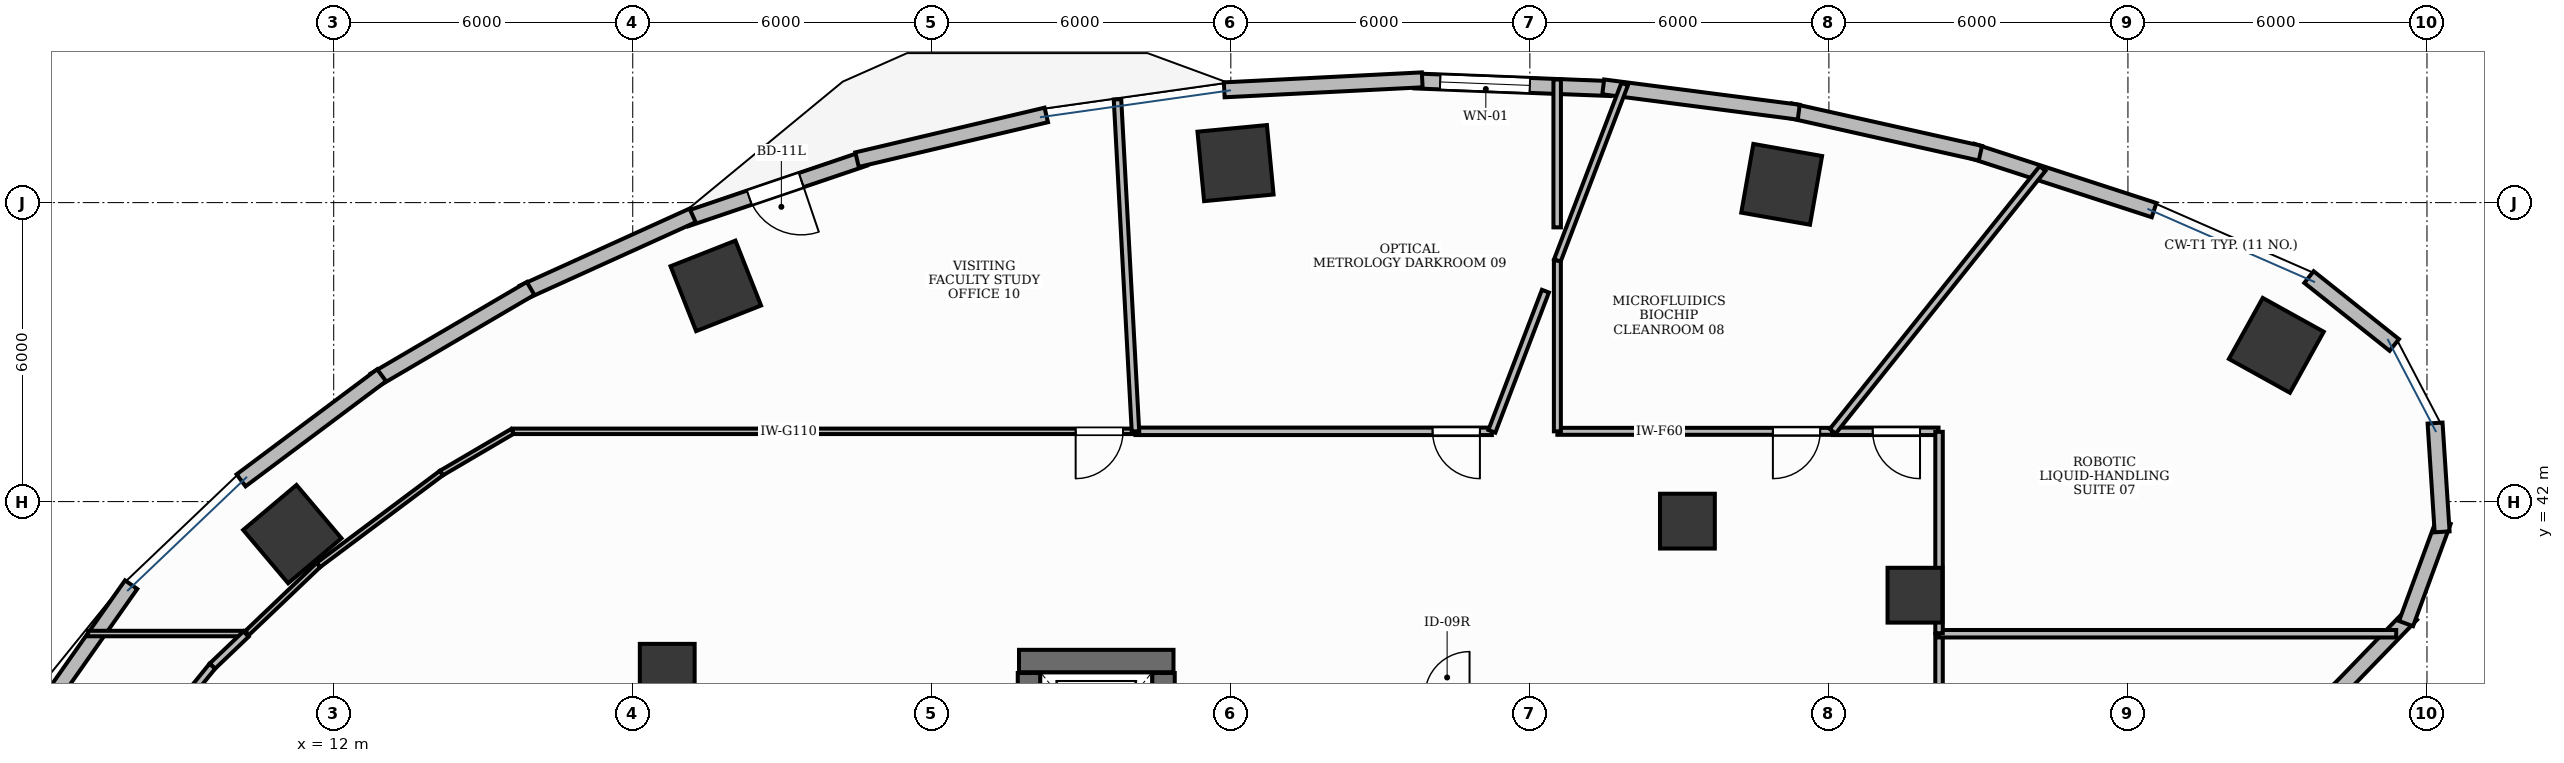
"""IFC4 building model, lengths in metres.
Left out: names, types, materials, properties, quantities, classifications, styles, units other than length and angle.
Written with IfcOpenShell. Run it as: python <this file> out.ifc"""

import sys

from ifc_helpers import new_model, si_unit, direction, frame, frame_2d, origin, origin_2d, place, context, subcontext, project, spatial, rectangle, extrude, element, fill, save


model = new_model("IFC4")
c1 = context("Model", 3, precision=1e-05, world=origin(), true_north=direction((0.0, 1.0)))
c2 = subcontext(c1, "Body", "Model", "MODEL_VIEW")
j1 = project(units=[si_unit("LENGTHUNIT", "METRE"), si_unit("PLANEANGLEUNIT", "RADIAN")], contexts=[c1])
p1 = place(None, origin())
s1 = spatial("IfcSite", under=j1, at=p1, CompositionType="ELEMENT")
p2 = place(p1, origin())
s2 = spatial("IfcBuilding", under=s1, at=p2, CompositionType="ELEMENT")
p3 = place(p2, frame((0.0, 0.0, 51.0)))
s3 = spatial("IfcBuildingStorey", under=s2, at=p3, CompositionType="ELEMENT", Elevation=51.0)
p4 = place(p3, frame((25.75, 38.8, 0.0), z_axis=(0.0, 0.0, 1.0), x_axis=(1.0, 0.0, 0.0)))
e1 = element("IfcWall", 1, at=p4, inside=s3, PredefinedType="SHEAR", context=c2, shape_type="SweptSolid", body=[
    extrude(rectangle(XDim=3.1, YDim=0.45, at=frame_2d((1.55, 0.0))), origin(), (0.0, 0.0, 1.0), 3.9),
])
for number, where, z_axis, x_axis in (
    (2, (25.95, 35.86, 0.0), (0.0, 0.0, 1.0), (0.0, 1.0, 0.0)),
    (3, (28.65, 35.86, 0.0), (0.0, 0.0, 1.0), (0.0, 1.0, 0.0)),
):
    element("IfcWall", number, at=place(p3, frame(where, z_axis=z_axis, x_axis=x_axis)), inside=s3, PredefinedType="SHEAR", context=c2, shape_type="SweptSolid", body=[
        extrude(rectangle(XDim=2.7, YDim=0.45, at=frame_2d((1.35, 0.0))), origin(), (0.0, 0.0, 1.0), 3.9),
    ])
p5 = place(p3, frame((50.977, 45.135, -0.0), z_axis=(0.0, 0.0, 1.0), x_axis=(-0.874535078577, 0.484962262797, 0.0)))
e4 = element("IfcColumn", 4, at=p5, inside=s3, PredefinedType="COLUMN", context=c2, shape_type="SweptSolid", body=[
    extrude(rectangle(XDim=1.4, YDim=1.4, at=origin_2d()), origin(), (0.0, 0.0, 1.0), 3.901),
])
p6 = place(p3, frame((43.727, 40.121, -0.0), z_axis=(0.0, 0.0, 1.0), x_axis=(1.0, 0.0, 0.0)))
e5 = element("IfcColumn", 5, at=p6, inside=s3, PredefinedType="COLUMN", context=c2, shape_type="SweptSolid", body=[
    extrude(rectangle(XDim=1.1, YDim=1.1, at=origin_2d()), origin(), (0.0, 0.0, 1.0), 3.901),
])
p7 = place(p3, frame((41.052, 48.367, -0.0), z_axis=(0.0, 0.0, 1.0), x_axis=(-0.984868307662, 0.173304404339, 0.0)))
e6 = element("IfcColumn", 6, at=p7, inside=s3, PredefinedType="COLUMN", context=c2, shape_type="SweptSolid", body=[
    extrude(rectangle(XDim=1.4, YDim=1.4, at=origin_2d()), origin(), (0.0, 0.0, 1.0), 3.901),
])
p8 = place(p3, frame((39.161, 41.608, -0.0), z_axis=(0.0, 0.0, 1.0), x_axis=(1.0, 0.0, 0.0)))
e7 = element("IfcColumn", 7, at=p8, inside=s3, PredefinedType="COLUMN", context=c2, shape_type="SweptSolid", body=[
    extrude(rectangle(XDim=1.1, YDim=1.1, at=origin_2d()), origin(), (0.0, 0.0, 1.0), 3.901),
])
for number, where, z_axis, x_axis in (
    (8, (30.094, 48.792, -0.0), (0.0, 0.0, 1.0), (0.995, 0.095, 0.0)),
    (9, (19.667, 46.329, -0.0), (0.0, 0.0, 1.0), (0.93, 0.367, 0.0)),
    (10, (11.17, 41.347, -0.0), (0.0, 0.0, 1.0), (0.764, 0.645, 0.0)),
):
    element("IfcColumn", number, at=place(p3, frame(where, z_axis=z_axis, x_axis=x_axis)), inside=s3, PredefinedType="COLUMN", context=c2, shape_type="SweptSolid", body=[
        extrude(rectangle(XDim=1.4, YDim=1.4, at=origin_2d()), origin(), (0.0, 0.0, 1.0), 3.901),
    ])
p9 = place(p3, frame((18.692, 38.595, -0.0), z_axis=(0.0, 0.0, 1.0), x_axis=(1.0, 0.0, 0.0)))
e11 = element("IfcColumn", 11, at=p9, inside=s3, PredefinedType="COLUMN", context=c2, shape_type="SweptSolid", body=[
    extrude(rectangle(XDim=1.1, YDim=1.1, at=origin_2d()), origin(), (0.0, 0.0, 1.0), 3.901),
])
p10 = place(p3, frame((37.623, 50.289, 0.0), z_axis=(0.0, 0.0, 1.0), x_axis=(-0.999247008469, 0.038799691558, 0.0)))
e12 = element("IfcWall", 12, at=p10, inside=s3, PredefinedType="STANDARD", context=c2, shape_type="SweptSolid", body=[
    extrude(rectangle(XDim=3.939, YDim=0.3, at=frame_2d((1.969, 0.0))), origin(), (0.0, 0.0, 1.0), 3.9),
])
p11 = place(p10, frame((1.625, 0.0, 0.9)))
e13 = element("IfcOpeningElement", 13, at=p11, cuts=e12, PredefinedType="OPENING", context=c2, shape_type="SweptSolid", body=[
    extrude(rectangle(XDim=1.8, YDim=2.1, at=frame_2d((0.9, 1.05))), frame((0.0, 0.165, 0.0), z_axis=(0.0, -1.0, 0.0), x_axis=(1.0, 0.0, 0.0)), (0.0, 0.0, 1.0), 0.33),
])
p12 = place(p3, frame((22.655, 48.884, 0.0), z_axis=(0.0, 0.0, 1.0), x_axis=(-0.947034337234, -0.321132315564, 0.0)))
e14 = element("IfcWall", 14, at=p12, inside=s3, PredefinedType="STANDARD", context=c2, shape_type="SweptSolid", body=[
    extrude(rectangle(XDim=3.79, YDim=0.3, at=frame_2d((1.895, 0.0))), origin(), (0.0, 0.0, 1.0), 3.9),
])
p13 = place(p12, frame((1.345, 0.0, 0.0)))
e15 = element("IfcOpeningElement", 15, at=p13, cuts=e14, PredefinedType="OPENING", context=c2, shape_type="SweptSolid", body=[
    extrude(rectangle(XDim=1.1, YDim=2.15, at=frame_2d((0.55, 1.075))), frame((0.0, 0.165, 0.0), z_axis=(0.0, -1.0, 0.0), x_axis=(1.0, 0.0, 0.0)), (0.0, 0.0, 1.0), 0.33),
])
p14 = place(p3, frame((48.525, 47.849, 0.0), z_axis=(0.0, 0.0, 1.0), x_axis=(-0.950965833732, 0.309295947393, 0.0)))
e16 = element("IfcWall", 16, at=p14, inside=s3, PredefinedType="STANDARD", context=c2, shape_type="SweptSolid", body=[
    extrude(rectangle(XDim=3.84, YDim=0.3, at=frame_2d((1.92, 0.0))), origin(), (0.0, 0.0, 1.0), 3.9),
])
p15 = place(p3, frame((45.04, 48.991, 0.0), z_axis=(0.0, 0.0, 1.0), x_axis=(-0.975868573345, 0.218358713032, 0.0)))
e17 = element("IfcWall", 17, at=p15, inside=s3, PredefinedType="STANDARD", context=c2, shape_type="SweptSolid", body=[
    extrude(rectangle(XDim=3.909, YDim=0.3, at=frame_2d((1.954, 0.0))), origin(), (0.0, 0.0, 1.0), 3.9),
])
p16 = place(p3, frame((41.395, 49.815, 0.0), z_axis=(0.0, 0.0, 1.0), x_axis=(-0.991734095036, 0.128310111617, 0.0)))
e18 = element("IfcWall", 18, at=p16, inside=s3, PredefinedType="STANDARD", context=c2, shape_type="SweptSolid", body=[
    extrude(rectangle(XDim=3.956, YDim=0.3, at=frame_2d((1.978, 0.0))), origin(), (0.0, 0.0, 1.0), 3.9),
])
p17 = place(p3, frame((33.84, 50.463, 0.0), z_axis=(0.0, 0.0, 1.0), x_axis=(-0.998732359232, -0.050335619826, 0.0)))
e19 = element("IfcWall", 19, at=p17, inside=s3, PredefinedType="STANDARD", context=c2, shape_type="SweptSolid", body=[
    extrude(rectangle(XDim=3.977, YDim=0.3, at=frame_2d((1.989, 0.0))), origin(), (0.0, 0.0, 1.0), 3.9),
])
p18 = place(p3, frame((26.297, 49.759, 0.0), z_axis=(0.0, 0.0, 1.0), x_axis=(-0.973197600754, -0.229970497863, 0.0)))
e20 = element("IfcWall", 20, at=p18, inside=s3, PredefinedType="STANDARD", context=c2, shape_type="SweptSolid", body=[
    extrude(rectangle(XDim=3.901, YDim=0.3, at=frame_2d((1.951, 0.0))), origin(), (0.0, 0.0, 1.0), 3.9),
])
p19 = place(p3, frame((19.201, 47.743, 0.0), z_axis=(0.0, 0.0, 1.0), x_axis=(-0.910623406862, -0.413237233166, 0.0)))
e21 = element("IfcWall", 21, at=p19, inside=s3, PredefinedType="STANDARD", context=c2, shape_type="SweptSolid", body=[
    extrude(rectangle(XDim=3.74, YDim=0.3, at=frame_2d((1.87, 0.0))), origin(), (0.0, 0.0, 1.0), 3.47),
])
p20 = place(p3, frame((15.951, 46.278, 0.0), z_axis=(0.0, 0.0, 1.0), x_axis=(-0.8624654944, -0.506115867139, 0.0)))
e22 = element("IfcWall", 22, at=p20, inside=s3, PredefinedType="STANDARD", context=c2, shape_type="SweptSolid", body=[
    extrude(rectangle(XDim=3.635, YDim=0.3, at=frame_2d((1.818, 0.0))), origin(), (0.0, 0.0, 1.0), 3.9),
])
p21 = place(p3, frame((12.961, 44.535, 0.0), z_axis=(0.0, 0.0, 1.0), x_axis=(-0.800823020995, -0.598901067827, 0.0)))
e23 = element("IfcWall", 23, at=p21, inside=s3, PredefinedType="STANDARD", context=c2, shape_type="SweptSolid", body=[
    extrude(rectangle(XDim=3.521, YDim=0.3, at=frame_2d((1.76, 0.0))), origin(), (0.0, 0.0, 1.0), 3.47),
])
p22 = place(p3, frame((7.936, 40.333, 0.0), z_axis=(0.0, 0.0, 1.0), x_axis=(-0.575165804445, -0.818036855769, 0.0)))
e24 = element("IfcWall", 24, at=p22, inside=s3, PredefinedType="STANDARD", context=c2, shape_type="SweptSolid", body=[
    extrude(rectangle(XDim=6.296, YDim=0.3, at=frame_2d((3.148, 0.0))), origin(), (0.0, 0.0, 1.0), 3.9),
])
p23 = place(p3, frame((49.709, 36.029, 0.0), z_axis=(0.0, 0.0, 1.0), x_axis=(0.754746490246, 0.656016566454, 0.0)))
e25 = element("IfcWall", 25, at=p23, inside=s3, PredefinedType="STANDARD", context=c2, shape_type="SweptSolid", body=[
    extrude(rectangle(XDim=3.43, YDim=0.3, at=frame_2d((1.715, 0.0))), origin(), (0.0, 0.0, 1.0), 3.9),
])
p24 = place(p3, frame((52.173, 38.161, 0.0), z_axis=(0.0, 0.0, 1.0), x_axis=(0.695404695719, 0.718618333451, 0.0)))
e26 = element("IfcWall", 26, at=p24, inside=s3, PredefinedType="STANDARD", context=c2, shape_type="SweptSolid", body=[
    extrude(rectangle(XDim=2.188, YDim=0.3, at=frame_2d((1.094, 0.0))), origin(), (0.0, 0.0, 1.0), 3.9),
])
for number, where, z_axis, x_axis in (
    (27, (53.58, 39.552, 0.0), (0.0, 0.0, 1.0), (0.345, 0.939, 0.0)),
    (28, (54.304, 41.393, 0.0), (0.0, 0.0, 1.0), (-0.065, 0.998, 0.0)),
    (29, (53.344, 45.143, 0.0), (0.0, 0.0, 1.0), (-0.782, 0.623, 0.0)),
):
    element("IfcWall", number, at=place(p3, frame(where, z_axis=z_axis, x_axis=x_axis)), inside=s3, PredefinedType="STANDARD", context=c2, shape_type="SweptSolid", body=[
        extrude(rectangle(XDim=2.188, YDim=0.3, at=frame_2d((1.094, 0.0))), origin(), (0.0, 0.0, 1.0), 3.9),
    ])
p25 = place(p3, frame((44.21, 29.53, 0.0), z_axis=(0.0, 0.0, 1.0), x_axis=(0.0, 1.0, 0.0)))
e30 = element("IfcWall", 30, at=p25, inside=s3, PredefinedType="PARTITIONING", context=c2, shape_type="SweptSolid", body=[
    extrude(rectangle(XDim=9.818, YDim=0.15, at=frame_2d((4.909, 0.0))), origin(), (0.0, 0.0, 1.0), 2.91),
])
p26 = place(p25, frame((1.274, 0.0, 0.0)))
e31 = element("IfcOpeningElement", 31, at=p26, cuts=e30, PredefinedType="OPENING", context=c2, shape_type="SweptSolid", body=[
    extrude(rectangle(XDim=0.95, YDim=2.15, at=frame_2d((0.475, 1.075))), frame((0.0, 0.09, 0.0), z_axis=(0.0, -1.0, 0.0), x_axis=(1.0, 0.0, 0.0)), (0.0, 0.0, 1.0), 0.18),
])
p27 = place(p3, frame((44.2, 43.41, 0.0), z_axis=(0.0, 0.0, 1.0), x_axis=(-1.0, 0.0, 0.0)))
e32 = element("IfcWall", 32, at=p27, inside=s3, PredefinedType="PARTITIONING", context=c2, shape_type="SweptSolid", body=[
    extrude(rectangle(XDim=2.124, YDim=0.15, at=frame_2d((1.062, 0.0))), origin(), (0.0, 0.0, 1.0), 2.91),
])
p28 = place(p27, frame((0.372, 0.0, 0.0)))
e33 = element("IfcOpeningElement", 33, at=p28, cuts=e32, PredefinedType="OPENING", context=c2, shape_type="SweptSolid", body=[
    extrude(rectangle(XDim=0.95, YDim=2.15, at=frame_2d((0.475, 1.075))), frame((0.0, 0.09, 0.0), z_axis=(0.0, -1.0, 0.0), x_axis=(1.0, 0.0, 0.0)), (0.0, 0.0, 1.0), 0.18),
])
p29 = place(p3, frame((42.066, 43.41, 0.0), z_axis=(0.0, 0.0, 1.0), x_axis=(-1.0, 0.0, 0.0)))
e34 = element("IfcWall", 34, at=p29, inside=s3, PredefinedType="PARTITIONING", context=c2, shape_type="SweptSolid", body=[
    extrude(rectangle(XDim=5.514, YDim=0.14, at=frame_2d((2.757, 0.0))), origin(), (0.0, 0.0, 1.0), 2.91),
])
p30 = place(p29, frame((0.24, 0.0, 0.0)))
e35 = element("IfcOpeningElement", 35, at=p30, cuts=e34, PredefinedType="OPENING", context=c2, shape_type="SweptSolid", body=[
    extrude(rectangle(XDim=0.95, YDim=2.15, at=frame_2d((0.475, 1.075))), frame((0.0, 0.085, 0.0), z_axis=(0.0, -1.0, 0.0), x_axis=(1.0, 0.0, 0.0)), (0.0, 0.0, 1.0), 0.17),
])
p31 = place(p3, frame((35.238, 43.41, 0.0), z_axis=(0.0, 0.0, 1.0), x_axis=(-1.0, 0.0, 0.0)))
e36 = element("IfcWall", 36, at=p31, inside=s3, PredefinedType="PARTITIONING", context=c2, shape_type="SweptSolid", body=[
    extrude(rectangle(XDim=7.151, YDim=0.15, at=frame_2d((3.575, 0.0))), origin(), (0.0, 0.0, 1.0), 2.91),
])
p32 = place(p31, frame((0.24, 0.0, 0.0)))
e37 = element("IfcOpeningElement", 37, at=p32, cuts=e36, PredefinedType="OPENING", context=c2, shape_type="SweptSolid", body=[
    extrude(rectangle(XDim=0.95, YDim=2.15, at=frame_2d((0.475, 1.075))), frame((0.0, 0.09, 0.0), z_axis=(0.0, -1.0, 0.0), x_axis=(1.0, 0.0, 0.0)), (0.0, 0.0, 1.0), 0.18),
])
p33 = place(p3, frame((28.077, 43.41, 0.0), z_axis=(0.0, 0.0, 1.0), x_axis=(-1.0, 0.0, 0.0)))
e38 = element("IfcWall", 38, at=p33, inside=s3, PredefinedType="MOVABLE", context=c2, shape_type="SweptSolid", body=[
    extrude(rectangle(XDim=12.486, YDim=0.11, at=frame_2d((6.243, 0.0))), origin(), (0.0, 0.0, 1.0), 2.91),
])
p34 = place(p33, frame((0.24, 0.0, 0.0)))
e39 = element("IfcOpeningElement", 39, at=p34, cuts=e38, PredefinedType="OPENING", context=c2, shape_type="SweptSolid", body=[
    extrude(rectangle(XDim=0.95, YDim=2.15, at=frame_2d((0.475, 1.075))), frame((0.0, 0.07, 0.0), z_axis=(0.0, -1.0, 0.0), x_axis=(1.0, 0.0, 0.0)), (0.0, 0.0, 1.0), 0.14),
])
p35 = place(p3, frame((44.21, 39.348, 0.0), z_axis=(0.0, 0.0, 1.0), x_axis=(1.0, 0.0, 0.0)))
e40 = element("IfcWall", 40, at=p35, inside=s3, PredefinedType="PARTITIONING", context=c2, shape_type="SweptSolid", body=[
    extrude(rectangle(XDim=9.173, YDim=0.15, at=frame_2d((4.586, 0.0))), origin(), (0.0, 0.0, 1.0), 2.91),
])
p36 = place(p3, frame((44.21, 39.358, 0.0), z_axis=(0.0, 0.0, 1.0), x_axis=(0.0, 1.0, 0.0)))
e41 = element("IfcWall", 41, at=p36, inside=s3, PredefinedType="PARTITIONING", context=c2, shape_type="SweptSolid", body=[
    extrude(rectangle(XDim=4.042, YDim=0.15, at=frame_2d((2.021, 0.0))), origin(), (0.0, 0.0, 1.0), 2.91),
])
p37 = place(p3, frame((42.076, 43.41, 0.0), z_axis=(0.0, 0.0, 1.0), x_axis=(0.623883060792, 0.781517707066, 0.0)))
e42 = element("IfcWall", 42, at=p37, inside=s3, PredefinedType="PARTITIONING", context=c2, shape_type="SweptSolid", body=[
    extrude(rectangle(XDim=6.75, YDim=0.15, at=frame_2d((3.375, 0.0))), origin(), (0.0, 0.0, 1.0), 2.91),
])
p38 = place(p3, frame((36.552, 43.41, 0.0), z_axis=(0.0, 0.0, 1.0), x_axis=(0.0, 1.0, 0.0)))
e43 = element("IfcWall", 43, at=p38, inside=s3, PredefinedType="PARTITIONING", context=c2, shape_type="SweptSolid", body=[
    extrude(rectangle(XDim=3.43, YDim=0.14, at=frame_2d((1.715, 0.0))), origin(), (0.0, 0.0, 1.0), 2.91),
])
p39 = place(p3, frame((36.552, 46.84, 0.0), z_axis=(0.0, 0.0, 1.0), x_axis=(0.356724060898, 0.934209796767, 0.0)))
e44 = element("IfcWall", 44, at=p39, inside=s3, PredefinedType="PARTITIONING", context=c2, shape_type="SweptSolid", body=[
    extrude(rectangle(XDim=3.789, YDim=0.14, at=frame_2d((1.895, 0.0))), origin(), (0.0, 0.0, 1.0), 2.91),
])
p40 = place(p3, frame((36.548, 50.47, 0.0), z_axis=(0.0, 0.0, 1.0), x_axis=(0.0, -1.0, 0.0)))
e45 = element("IfcWall", 45, at=p40, inside=s3, PredefinedType="PARTITIONING", context=c2, shape_type="SweptSolid", body=[
    extrude(rectangle(XDim=2.968, YDim=0.15, at=frame_2d((1.484, 0.0))), origin(), (0.0, 0.0, 1.0), 2.91),
])
p41 = place(p3, frame((36.312, 46.223, 0.0), z_axis=(0.0, 0.0, 1.0), x_axis=(-0.356750456219, -0.934199717399, 0.0)))
e46 = element("IfcWall", 46, at=p41, inside=s3, PredefinedType="PARTITIONING", context=c2, shape_type="SweptSolid", body=[
    extrude(rectangle(XDim=3.011, YDim=0.15, at=frame_2d((1.506, 0.0))), origin(), (0.0, 0.0, 1.0), 2.91),
])
p42 = place(p3, frame((28.087, 43.41, 0.0), z_axis=(0.0, 0.0, 1.0), x_axis=(-0.054075825804, 0.998536832102, 0.0)))
e47 = element("IfcWall", 47, at=p42, inside=s3, PredefinedType="PARTITIONING", context=c2, shape_type="SweptSolid", body=[
    extrude(rectangle(XDim=6.673, YDim=0.15, at=frame_2d((3.336, 0.0))), origin(), (0.0, 0.0, 1.0), 2.91),
])
p43 = place(p3, frame((15.586, 43.409, 0.0), z_axis=(0.0, 0.0, 1.0), x_axis=(-0.862446636904, -0.506148000582, 0.0)))
e48 = element("IfcWall", 48, at=p43, inside=s3, PredefinedType="MOVABLE", context=c2, shape_type="SweptSolid", body=[
    extrude(rectangle(XDim=1.652, YDim=0.11, at=frame_2d((0.826, 0.0))), origin(), (0.0, 0.0, 1.0), 2.91),
])
p44 = place(p3, frame((14.16, 42.572, 0.0), z_axis=(0.0, 0.0, 1.0), x_axis=(-0.800808090092, -0.598921032227, 0.0)))
e49 = element("IfcWall", 49, at=p44, inside=s3, PredefinedType="MOVABLE", context=c2, shape_type="SweptSolid", body=[
    extrude(rectangle(XDim=3.079, YDim=0.11, at=frame_2d((1.54, 0.0))), origin(), (0.0, 0.0, 1.0), 2.91),
])
p45 = place(p3, frame((11.693, 40.727, 0.0), z_axis=(0.0, 0.0, 1.0), x_axis=(-0.723636479822, -0.690181313185, 0.0)))
e50 = element("IfcWall", 50, at=p45, inside=s3, PredefinedType="MOVABLE", context=c2, shape_type="SweptSolid", body=[
    extrude(rectangle(XDim=1.992, YDim=0.11, at=frame_2d((0.996, 0.0))), origin(), (0.0, 0.0, 1.0), 2.91),
])
p46 = place(p3, frame((10.252, 39.352, 0.0), z_axis=(0.0, 0.0, 1.0), x_axis=(-1.0, 0.0, 0.0)))
e51 = element("IfcWall", 51, at=p46, inside=s3, PredefinedType="MOVABLE", context=c2, shape_type="SweptSolid", body=[
    extrude(rectangle(XDim=3.18, YDim=0.11, at=frame_2d((1.59, 0.0))), origin(), (0.0, 0.0, 1.0), 2.91),
])
p47 = place(p3, frame((10.241, 39.342, 0.0), z_axis=(0.0, 0.0, 1.0), x_axis=(-0.723783132033, -0.690027519585, 0.0)))
e52 = element("IfcWall", 52, at=p47, inside=s3, PredefinedType="PARTITIONING", context=c2, shape_type="SweptSolid", body=[
    extrude(rectangle(XDim=0.933, YDim=0.15, at=frame_2d((0.467, 0.0))), origin(), (0.0, 0.0, 1.0), 2.91),
])
p48 = place(p3, frame((9.565, 38.697, 0.0), z_axis=(0.0, 0.0, 1.0), x_axis=(-0.629270515505, -0.777186347227, 0.0)))
e53 = element("IfcWall", 53, at=p48, inside=s3, PredefinedType="PARTITIONING", context=c2, shape_type="SweptSolid", body=[
    extrude(rectangle(XDim=2.817, YDim=0.15, at=frame_2d((1.409, 0.0))), origin(), (0.0, 0.0, 1.0), 2.91),
])
p49 = place(p11, origin())
e54 = element("IfcWindow", 54, at=p49, inside=s3, PartitioningType="SINGLE_PANEL", PredefinedType="WINDOW", context=c2, shape_type="SweptSolid", body=[
    extrude(rectangle(XDim=1.8, YDim=2.1, at=frame_2d((0.9, 1.05))), frame((0.0, 0.03, 0.0), z_axis=(0.0, -1.0, 0.0), x_axis=(1.0, 0.0, 0.0)), (0.0, 0.0, 1.0), 0.06),
])
fill(e13, e54)
p50 = place(p13, origin())
e55 = element("IfcDoor", 55, at=p50, inside=s3, OperationType="SINGLE_SWING_LEFT", PredefinedType="DOOR", context=c2, shape_type="SweptSolid", body=[
    extrude(rectangle(XDim=1.1, YDim=2.15, at=frame_2d((0.55, 1.075))), frame((0.0, 0.025, 0.0), z_axis=(0.0, -1.0, 0.0), x_axis=(1.0, 0.0, 0.0)), (0.0, 0.0, 1.0), 0.05),
])
fill(e15, e55)
p51 = place(p28, origin())
e56 = element("IfcDoor", 56, at=p51, inside=s3, OperationType="SINGLE_SWING_LEFT", PredefinedType="DOOR", context=c2, shape_type="SweptSolid", body=[
    extrude(rectangle(XDim=0.95, YDim=2.15, at=frame_2d((0.475, 1.075))), frame((0.0, 0.025, 0.0), z_axis=(0.0, -1.0, 0.0), x_axis=(1.0, 0.0, 0.0)), (0.0, 0.0, 1.0), 0.05),
])
fill(e33, e56)
p52 = place(p30, origin())
e57 = element("IfcDoor", 57, at=p52, inside=s3, OperationType="SINGLE_SWING_RIGHT", PredefinedType="DOOR", context=c2, shape_type="SweptSolid", body=[
    extrude(rectangle(XDim=0.95, YDim=2.15, at=frame_2d((0.475, 1.075))), frame((0.0, 0.025, 0.0), z_axis=(0.0, -1.0, 0.0), x_axis=(1.0, 0.0, 0.0)), (0.0, 0.0, 1.0), 0.05),
])
fill(e35, e57)
p53 = place(p32, origin())
e58 = element("IfcDoor", 58, at=p53, inside=s3, OperationType="SINGLE_SWING_LEFT", PredefinedType="DOOR", context=c2, shape_type="SweptSolid", body=[
    extrude(rectangle(XDim=0.95, YDim=2.15, at=frame_2d((0.475, 1.075))), frame((0.0, 0.025, 0.0), z_axis=(0.0, -1.0, 0.0), x_axis=(1.0, 0.0, 0.0)), (0.0, 0.0, 1.0), 0.05),
])
fill(e37, e58)
p54 = place(p34, origin())
e59 = element("IfcDoor", 59, at=p54, inside=s3, OperationType="SINGLE_SWING_RIGHT", PredefinedType="DOOR", context=c2, shape_type="SweptSolid", body=[
    extrude(rectangle(XDim=0.95, YDim=2.15, at=frame_2d((0.475, 1.075))), frame((0.0, 0.025, 0.0), z_axis=(0.0, -1.0, 0.0), x_axis=(1.0, 0.0, 0.0)), (0.0, 0.0, 1.0), 0.05),
])
fill(e39, e59)
save(model, sys.argv[1])
